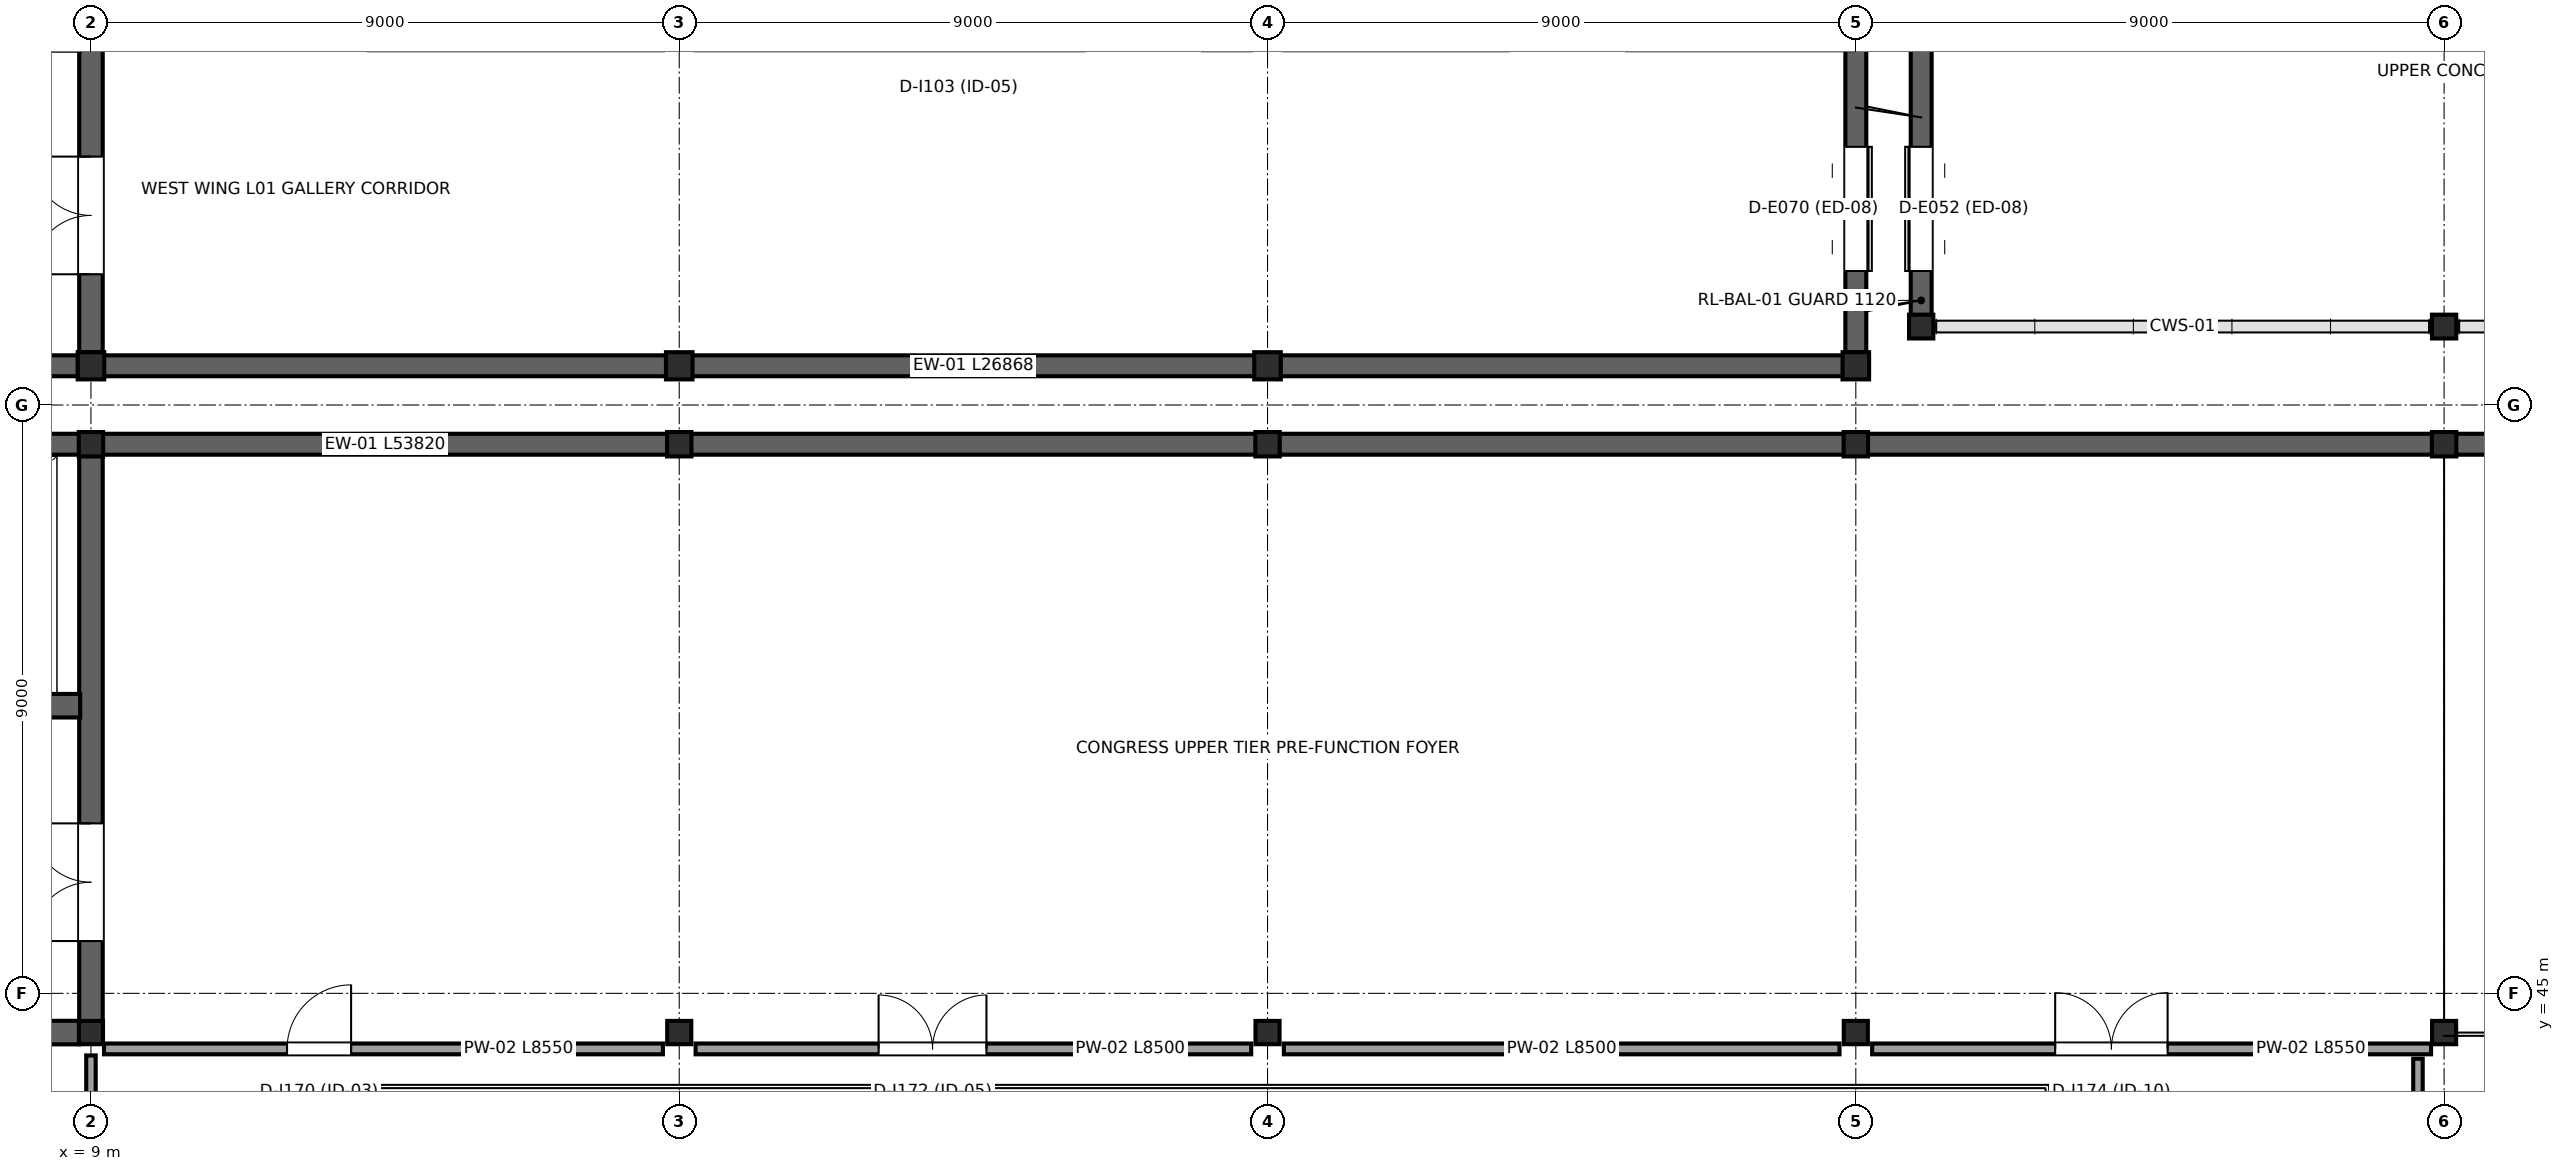
"""IFC4 building model, lengths in metres.
Left out: names, types, materials, properties, quantities, classifications, styles, units other than length and angle.
Written with IfcOpenShell. Run it as: python <this file> out.ifc"""

import sys

from ifc_helpers import new_model, si_unit, direction, frame, frame_2d, origin, origin_2d, place, context, subcontext, project, spatial, rectangle, i_section, extrude, element, fill, save


model = new_model("IFC4")
c1 = context("Model", 3, precision=1e-05, world=origin(), true_north=direction((0.0, 1.0)))
c2 = subcontext(c1, "Body", "Model", "MODEL_VIEW")
j1 = project(units=[si_unit("LENGTHUNIT", "METRE"), si_unit("PLANEANGLEUNIT", "RADIAN")], contexts=[c1])
p1 = place(None, origin())
s1 = spatial("IfcSite", under=j1, at=p1, CompositionType="ELEMENT")
p2 = place(p1, origin())
s2 = spatial("IfcBuilding", under=s1, at=p2, CompositionType="ELEMENT")
p3 = place(p2, frame((0.0, 0.0, 6.0)))
s3 = spatial("IfcBuildingStorey", under=s2, at=p3, CompositionType="ELEMENT", Elevation=6.0)
for number, where, z_axis, x_axis in (
    (1, (37.0, 55.2, 0.0), (0.0, 0.0, 1.0), (1.0, 0.0, 0.0)),
    (2, (45.0, 55.2, 0.0), (0.0, 0.0, 1.0), (1.0, 0.0, 0.0)),
):
    element("IfcColumn", number, at=place(p3, frame(where, z_axis=z_axis, x_axis=x_axis)), inside=s3, PredefinedType="COLUMN", context=c2, shape_type="SweptSolid", body=[
        extrude(i_section(OverallWidth=0.371, OverallDepth=0.364, WebThickness=0.013, FlangeThickness=0.022, at=origin_2d()), origin(), (0.0, 0.0, 1.0), 6.0),
    ])
for number, where, z_axis, x_axis in (
    (3, (45.0, 53.4, 0.0), (0.0, 0.0, 1.0), (1.0, 0.0, 0.0)),
    (4, (36.0, 53.4, 0.0), (0.0, 0.0, 1.0), (1.0, 0.0, 0.0)),
    (5, (27.0, 53.4, 0.0), (0.0, 0.0, 1.0), (1.0, 0.0, 0.0)),
    (6, (18.0, 53.4, 0.0), (0.0, 0.0, 1.0), (1.0, 0.0, 0.0)),
    (7, (9.0, 53.4, 0.0), (0.0, 0.0, 1.0), (1.0, 0.0, 0.0)),
):
    element("IfcColumn", number, at=place(p3, frame(where, z_axis=z_axis, x_axis=x_axis)), inside=s3, PredefinedType="COLUMN", context=c2, shape_type="SweptSolid", body=[
        extrude(i_section(OverallWidth=0.373, OverallDepth=0.373, WebThickness=0.016, FlangeThickness=0.026, at=origin_2d()), origin(), (0.0, 0.0, 1.0), 6.0),
    ])
for number, where, z_axis, x_axis in (
    (8, (9.0, 44.4, 0.0), (0.0, 0.0, 1.0), (1.0, 0.0, 0.0)),
    (9, (18.0, 44.4, 0.0), (0.0, 0.0, 1.0), (1.0, 0.0, 0.0)),
    (10, (27.0, 44.4, 0.0), (0.0, 0.0, 1.0), (1.0, 0.0, 0.0)),
    (11, (36.0, 44.4, 0.0), (0.0, 0.0, 1.0), (1.0, 0.0, 0.0)),
    (12, (45.0, 44.4, 0.0), (0.0, 0.0, 1.0), (1.0, 0.0, 0.0)),
):
    element("IfcColumn", number, at=place(p3, frame(where, z_axis=z_axis, x_axis=x_axis)), inside=s3, PredefinedType="COLUMN", context=c2, shape_type="SweptSolid", body=[
        extrude(i_section(OverallWidth=0.368, OverallDepth=0.356, WebThickness=0.011, FlangeThickness=0.018, at=origin_2d()), origin(), (0.0, 0.0, 1.0), 6.0),
    ])
for number, where, z_axis, x_axis in (
    (13, (9.0, 54.6, 0.0), (0.0, 0.0, 1.0), (1.0, 0.0, 0.0)),
    (14, (18.0, 54.6, 0.0), (0.0, 0.0, 1.0), (1.0, 0.0, 0.0)),
    (15, (27.0, 54.6, 0.0), (0.0, 0.0, 1.0), (1.0, 0.0, 0.0)),
    (16, (36.0, 54.6, 0.0), (0.0, 0.0, 1.0), (1.0, 0.0, 0.0)),
):
    element("IfcColumn", number, at=place(p3, frame(where, z_axis=z_axis, x_axis=x_axis)), inside=s3, PredefinedType="COLUMN", context=c2, shape_type="SweptSolid", body=[
        extrude(i_section(OverallWidth=0.406, OverallDepth=0.416, WebThickness=0.03, FlangeThickness=0.048, at=origin_2d()), origin(), (0.0, 0.0, 1.0), 6.0),
    ])
p4 = place(p3, frame((37.0, 55.376, 0.0), z_axis=(0.0, 0.0, 1.0), x_axis=(0.0, 1.0, 0.0)))
e17 = element("IfcWall", 17, at=p4, inside=s3, PredefinedType="STANDARD", context=c2, shape_type="SweptSolid", body=[
    extrude(rectangle(XDim=7.448, YDim=0.32, at=frame_2d((3.724, 0.0))), origin(), (0.0, 0.0, 1.0), 5.78),
])
p5 = place(p4, frame((0.674, 0.0, 0.0)))
e18 = element("IfcOpeningElement", 18, at=p5, cuts=e17, PredefinedType="OPENING", context=c2, shape_type="SweptSolid", body=[
    extrude(rectangle(XDim=1.9, YDim=2.38, at=frame_2d((0.95, 1.19))), frame((0.0, 0.17, 0.0), z_axis=(0.0, -1.0, 0.0), x_axis=(1.0, 0.0, 0.0)), (0.0, 0.0, 1.0), 0.34),
])
p6 = place(p4, frame((4.748, 0.0, 1.1)))
e19 = element("IfcOpeningElement", 19, at=p6, cuts=e17, PredefinedType="OPENING", context=c2, shape_type="SweptSolid", body=[
    extrude(rectangle(XDim=1.8, YDim=1.95, at=frame_2d((0.9, 0.975))), frame((0.0, 0.17, 0.0), z_axis=(0.0, -1.0, 0.0), x_axis=(1.0, 0.0, 0.0)), (0.0, 0.0, 1.0), 0.34),
])
for number, where, z_axis, x_axis in (
    (20, (0.015, 53.4, 0.0), (0.0, 0.0, 1.0), (1.0, 0.0, 0.0)),
    (21, (9.015, 53.4, 0.0), (0.0, 0.0, 1.0), (1.0, 0.0, 0.0)),
    (22, (18.015, 53.4, 0.0), (0.0, 0.0, 1.0), (1.0, 0.0, 0.0)),
    (23, (27.015, 53.4, 0.0), (0.0, 0.0, 1.0), (1.0, 0.0, 0.0)),
    (24, (36.015, 53.4, 0.0), (0.0, 0.0, 1.0), (1.0, 0.0, 0.0)),
    (25, (45.015, 53.4, 0.0), (0.0, 0.0, 1.0), (1.0, 0.0, 0.0)),
):
    element("IfcWall", number, at=place(p3, frame(where, z_axis=z_axis, x_axis=x_axis)), inside=s3, PredefinedType="STANDARD", context=c2, shape_type="SweptSolid", body=[
        extrude(rectangle(XDim=8.97, YDim=0.32, at=frame_2d((4.485, 0.0))), origin(), (0.0, 0.0, 1.0), 5.75),
    ])
p7 = place(p3, frame((36.0, 63.398, 0.0), z_axis=(0.0, 0.0, 1.0), x_axis=(0.0, -1.0, 0.0)))
e26 = element("IfcWall", 26, at=p7, inside=s3, PredefinedType="STANDARD", context=c2, shape_type="SweptSolid", body=[
    extrude(rectangle(XDim=8.596, YDim=0.32, at=frame_2d((4.298, 0.0))), origin(), (0.0, 0.0, 1.0), 5.78),
])
p8 = place(p7, frame((5.448, 0.0, 0.0)))
e27 = element("IfcOpeningElement", 27, at=p8, cuts=e26, PredefinedType="OPENING", context=c2, shape_type="SweptSolid", body=[
    extrude(rectangle(XDim=1.9, YDim=2.38, at=frame_2d((0.95, 1.19))), frame((0.0, 0.17, 0.0), z_axis=(0.0, -1.0, 0.0), x_axis=(1.0, 0.0, 0.0)), (0.0, 0.0, 1.0), 0.34),
])
p9 = place(p7, frame((0.948, 0.0, 1.1)))
e28 = element("IfcOpeningElement", 28, at=p9, cuts=e26, PredefinedType="OPENING", context=c2, shape_type="SweptSolid", body=[
    extrude(rectangle(XDim=1.65, YDim=1.8, at=frame_2d((0.825, 0.9))), frame((0.0, 0.17, 0.0), z_axis=(0.0, -1.0, 0.0), x_axis=(1.0, 0.0, 0.0)), (0.0, 0.0, 1.0), 0.34),
])
for number, where, z_axis, x_axis in (
    (29, (8.978, 54.6, 0.0), (0.0, 0.0, 1.0), (-1.0, 0.0, 0.0)),
    (30, (17.978, 54.6, 0.0), (0.0, 0.0, 1.0), (-1.0, 0.0, 0.0)),
    (31, (26.978, 54.6, 0.0), (0.0, 0.0, 1.0), (-1.0, 0.0, 0.0)),
    (32, (35.978, 54.6, 0.0), (0.0, 0.0, 1.0), (-1.0, 0.0, 0.0)),
):
    element("IfcWall", number, at=place(p3, frame(where, z_axis=z_axis, x_axis=x_axis)), inside=s3, PredefinedType="STANDARD", context=c2, shape_type="SweptSolid", body=[
        extrude(rectangle(XDim=8.956, YDim=0.32, at=frame_2d((4.478, 0.0))), origin(), (0.0, 0.0, 1.0), 5.78),
    ])
p10 = place(p3, frame((9.0, 44.573, 0.0), z_axis=(0.0, 0.0, 1.0), x_axis=(0.0, 1.0, 0.0)))
e33 = element("IfcWall", 33, at=p10, inside=s3, PredefinedType="SHEAR", context=c2, shape_type="SweptSolid", body=[
    extrude(rectangle(XDim=8.646, YDim=0.36, at=frame_2d((4.323, 0.0))), origin(), (0.0, 0.0, 1.0), 5.75),
])
p11 = place(p10, frame((1.227, 0.0, 0.0)))
e34 = element("IfcOpeningElement", 34, at=p11, cuts=e33, PredefinedType="OPENING", context=c2, shape_type="SweptSolid", body=[
    extrude(rectangle(XDim=1.8, YDim=2.3, at=frame_2d((0.9, 1.15))), frame((0.0, 0.19, 0.0), z_axis=(0.0, -1.0, 0.0), x_axis=(1.0, 0.0, 0.0)), (0.0, 0.0, 1.0), 0.38),
])
p12 = place(p3, frame((0.181, 44.4, 0.0), z_axis=(0.0, 0.0, 1.0), x_axis=(1.0, 0.0, 0.0)))
e35 = element("IfcWall", 35, at=p12, inside=s3, PredefinedType="SHEAR", context=c2, shape_type="SweptSolid", body=[
    extrude(rectangle(XDim=8.64, YDim=0.36, at=frame_2d((4.32, 0.0))), origin(), (0.0, 0.0, 1.0), 5.75),
])
p13 = place(p3, frame((4.615, 49.4, 0.0), z_axis=(0.0, 0.0, 1.0), x_axis=(1.0, 0.0, 0.0)))
e36 = element("IfcWall", 36, at=p13, inside=s3, PredefinedType="SHEAR", context=c2, shape_type="SweptSolid", body=[
    extrude(rectangle(XDim=4.22, YDim=0.36, at=frame_2d((2.11, 0.0))), origin(), (0.0, 0.0, 1.0), 5.75),
])
p14 = place(p13, frame((1.51, 0.0, 0.0)))
e37 = element("IfcOpeningElement", 37, at=p14, cuts=e36, PredefinedType="OPENING", context=c2, shape_type="SweptSolid", body=[
    extrude(rectangle(XDim=1.2, YDim=2.3, at=frame_2d((0.6, 1.15))), frame((0.0, 0.19, 0.0), z_axis=(0.0, -1.0, 0.0), x_axis=(1.0, 0.0, 0.0)), (0.0, 0.0, 1.0), 0.38),
])
p15 = place(p3, frame((9.0, 54.803, 0.0), z_axis=(0.0, 0.0, 1.0), x_axis=(0.0, 1.0, 0.0)))
e38 = element("IfcWall", 38, at=p15, inside=s3, PredefinedType="SHEAR", context=c2, shape_type="SweptSolid", body=[
    extrude(rectangle(XDim=8.594, YDim=0.36, at=frame_2d((4.297, 0.0))), origin(), (0.0, 0.0, 1.0), 5.78),
])
p16 = place(p15, frame((1.197, 0.0, 0.0)))
e39 = element("IfcOpeningElement", 39, at=p16, cuts=e38, PredefinedType="OPENING", context=c2, shape_type="SweptSolid", body=[
    extrude(rectangle(XDim=1.8, YDim=2.3, at=frame_2d((0.9, 1.15))), frame((0.0, 0.19, 0.0), z_axis=(0.0, -1.0, 0.0), x_axis=(1.0, 0.0, 0.0)), (0.0, 0.0, 1.0), 0.38),
])
p17 = place(p3, frame((44.6, 38.6, 0.0), z_axis=(0.0, 0.0, 1.0), x_axis=(0.0, 1.0, 0.0)))
e40 = element("IfcWall", 40, at=p17, inside=s3, PredefinedType="PARTITIONING", context=c2, shape_type="SweptSolid", body=[
    extrude(rectangle(XDim=5.4, YDim=0.145, at=frame_2d((2.7, 0.0))), origin(), (0.0, 0.0, 1.0), 4.55),
])
p18 = place(p17, frame((1.1, 0.0, 0.0)))
e41 = element("IfcOpeningElement", 41, at=p18, cuts=e40, PredefinedType="OPENING", context=c2, shape_type="SweptSolid", body=[
    extrude(rectangle(XDim=0.98, YDim=2.15, at=frame_2d((0.49, 1.075))), frame((0.0, 0.083, 0.0), z_axis=(0.0, -1.0, 0.0), x_axis=(1.0, 0.0, 0.0)), (0.0, 0.0, 1.0), 0.165),
])
p19 = place(p3, frame((9.2, 44.15, 0.0), z_axis=(0.0, 0.0, 1.0), x_axis=(1.0, 0.0, 0.0)))
e42 = element("IfcWall", 42, at=p19, inside=s3, PredefinedType="PARTITIONING", context=c2, shape_type="SweptSolid", body=[
    extrude(rectangle(XDim=8.55, YDim=0.165, at=frame_2d((4.275, 0.0))), origin(), (0.0, 0.0, 1.0), 4.55),
])
p20 = place(p19, frame((2.8, 0.0, 0.0)))
e43 = element("IfcOpeningElement", 43, at=p20, cuts=e42, PredefinedType="OPENING", context=c2, shape_type="SweptSolid", body=[
    extrude(rectangle(XDim=0.98, YDim=2.15, at=frame_2d((0.49, 1.075))), frame((0.0, 0.093, 0.0), z_axis=(0.0, -1.0, 0.0), x_axis=(1.0, 0.0, 0.0)), (0.0, 0.0, 1.0), 0.185),
])
p21 = place(p3, frame((18.25, 44.15, 0.0), z_axis=(0.0, 0.0, 1.0), x_axis=(1.0, 0.0, 0.0)))
e44 = element("IfcWall", 44, at=p21, inside=s3, PredefinedType="PARTITIONING", context=c2, shape_type="SweptSolid", body=[
    extrude(rectangle(XDim=8.5, YDim=0.165, at=frame_2d((4.25, 0.0))), origin(), (0.0, 0.0, 1.0), 4.55),
])
p22 = place(p21, frame((2.8, 0.0, 0.0)))
e45 = element("IfcOpeningElement", 45, at=p22, cuts=e44, PredefinedType="OPENING", context=c2, shape_type="SweptSolid", body=[
    extrude(rectangle(XDim=1.65, YDim=2.25, at=frame_2d((0.825, 1.125))), frame((0.0, 0.093, 0.0), z_axis=(0.0, -1.0, 0.0), x_axis=(1.0, 0.0, 0.0)), (0.0, 0.0, 1.0), 0.185),
])
p23 = place(p3, frame((27.25, 44.15, 0.0), z_axis=(0.0, 0.0, 1.0), x_axis=(1.0, 0.0, 0.0)))
e46 = element("IfcWall", 46, at=p23, inside=s3, PredefinedType="PARTITIONING", context=c2, shape_type="SweptSolid", body=[
    extrude(rectangle(XDim=8.5, YDim=0.165, at=frame_2d((4.25, 0.0))), origin(), (0.0, 0.0, 1.0), 4.55),
])
p24 = place(p3, frame((36.25, 44.15, 0.0), z_axis=(0.0, 0.0, 1.0), x_axis=(1.0, 0.0, 0.0)))
e47 = element("IfcWall", 47, at=p24, inside=s3, PredefinedType="PARTITIONING", context=c2, shape_type="SweptSolid", body=[
    extrude(rectangle(XDim=8.55, YDim=0.165, at=frame_2d((4.275, 0.0))), origin(), (0.0, 0.0, 1.0), 4.55),
])
p25 = place(p24, frame((2.8, 0.0, 0.0)))
e48 = element("IfcOpeningElement", 48, at=p25, cuts=e47, PredefinedType="OPENING", context=c2, shape_type="SweptSolid", body=[
    extrude(rectangle(XDim=1.72, YDim=2.28, at=frame_2d((0.86, 1.14))), frame((0.0, 0.093, 0.0), z_axis=(0.0, -1.0, 0.0), x_axis=(1.0, 0.0, 0.0)), (0.0, 0.0, 1.0), 0.185),
])
p26 = place(p3, frame((9.0, 27.25, 0.0), z_axis=(0.0, 0.0, 1.0), x_axis=(0.0, 1.0, 0.0)))
e49 = element("IfcWall", 49, at=p26, inside=s3, PredefinedType="PARTITIONING", context=c2, shape_type="SweptSolid", body=[
    extrude(rectangle(XDim=16.8, YDim=0.145, at=frame_2d((8.4, 0.0))), origin(), (0.0, 0.0, 1.0), 4.55),
])
p27 = place(p26, frame((6.0, 0.0, 0.0)))
e50 = element("IfcOpeningElement", 50, at=p27, cuts=e49, PredefinedType="OPENING", context=c2, shape_type="SweptSolid", body=[
    extrude(rectangle(XDim=0.95, YDim=2.12, at=frame_2d((0.475, 1.06))), frame((0.0, 0.083, 0.0), z_axis=(0.0, -1.0, 0.0), x_axis=(1.0, 0.0, 0.0)), (0.0, 0.0, 1.0), 0.165),
])
p28 = place(p5, origin())
e51 = element("IfcDoor", 51, at=p28, inside=s3, OperationType="DOUBLE_DOOR_SLIDING", PredefinedType="DOOR", context=c2, shape_type="SweptSolid", body=[
    extrude(rectangle(XDim=1.9, YDim=2.38, at=frame_2d((0.95, 1.19))), frame((0.0, 0.025, 0.0), z_axis=(0.0, -1.0, 0.0), x_axis=(1.0, 0.0, 0.0)), (0.0, 0.0, 1.0), 0.05),
])
fill(e18, e51)
p29 = place(p8, origin())
e52 = element("IfcDoor", 52, at=p29, inside=s3, OperationType="DOUBLE_DOOR_SLIDING", PredefinedType="DOOR", context=c2, shape_type="SweptSolid", body=[
    extrude(rectangle(XDim=1.9, YDim=2.38, at=frame_2d((0.95, 1.19))), frame((0.0, 0.025, 0.0), z_axis=(0.0, -1.0, 0.0), x_axis=(1.0, 0.0, 0.0)), (0.0, 0.0, 1.0), 0.05),
])
fill(e27, e52)
p30 = place(p11, origin())
e53 = element("IfcDoor", 53, at=p30, inside=s3, OperationType="DOUBLE_DOOR_SINGLE_SWING", PredefinedType="DOOR", context=c2, shape_type="SweptSolid", body=[
    extrude(rectangle(XDim=1.8, YDim=2.3, at=frame_2d((0.9, 1.15))), frame((0.0, 0.025, 0.0), z_axis=(0.0, -1.0, 0.0), x_axis=(1.0, 0.0, 0.0)), (0.0, 0.0, 1.0), 0.05),
])
fill(e34, e53)
p31 = place(p16, origin())
e54 = element("IfcDoor", 54, at=p31, inside=s3, OperationType="DOUBLE_DOOR_SINGLE_SWING", PredefinedType="DOOR", context=c2, shape_type="SweptSolid", body=[
    extrude(rectangle(XDim=1.8, YDim=2.3, at=frame_2d((0.9, 1.15))), frame((0.0, 0.025, 0.0), z_axis=(0.0, -1.0, 0.0), x_axis=(1.0, 0.0, 0.0)), (0.0, 0.0, 1.0), 0.05),
])
fill(e39, e54)
p32 = place(p20, origin())
e55 = element("IfcDoor", 55, at=p32, inside=s3, OperationType="SINGLE_SWING_RIGHT", PredefinedType="DOOR", context=c2, shape_type="SweptSolid", body=[
    extrude(rectangle(XDim=0.98, YDim=2.15, at=frame_2d((0.49, 1.075))), frame((0.0, 0.025, 0.0), z_axis=(0.0, -1.0, 0.0), x_axis=(1.0, 0.0, 0.0)), (0.0, 0.0, 1.0), 0.05),
])
fill(e43, e55)
p33 = place(p22, origin())
e56 = element("IfcDoor", 56, at=p33, inside=s3, OperationType="DOUBLE_DOOR_SINGLE_SWING", PredefinedType="DOOR", context=c2, shape_type="SweptSolid", body=[
    extrude(rectangle(XDim=1.65, YDim=2.25, at=frame_2d((0.825, 1.125))), frame((0.0, 0.025, 0.0), z_axis=(0.0, -1.0, 0.0), x_axis=(1.0, 0.0, 0.0)), (0.0, 0.0, 1.0), 0.05),
])
fill(e45, e56)
p34 = place(p25, origin())
e57 = element("IfcDoor", 57, at=p34, inside=s3, OperationType="DOUBLE_DOOR_SINGLE_SWING", PredefinedType="DOOR", context=c2, shape_type="SweptSolid", body=[
    extrude(rectangle(XDim=1.72, YDim=2.28, at=frame_2d((0.86, 1.14))), frame((0.0, 0.025, 0.0), z_axis=(0.0, -1.0, 0.0), x_axis=(1.0, 0.0, 0.0)), (0.0, 0.0, 1.0), 0.05),
])
fill(e48, e57)
save(model, sys.argv[1])
